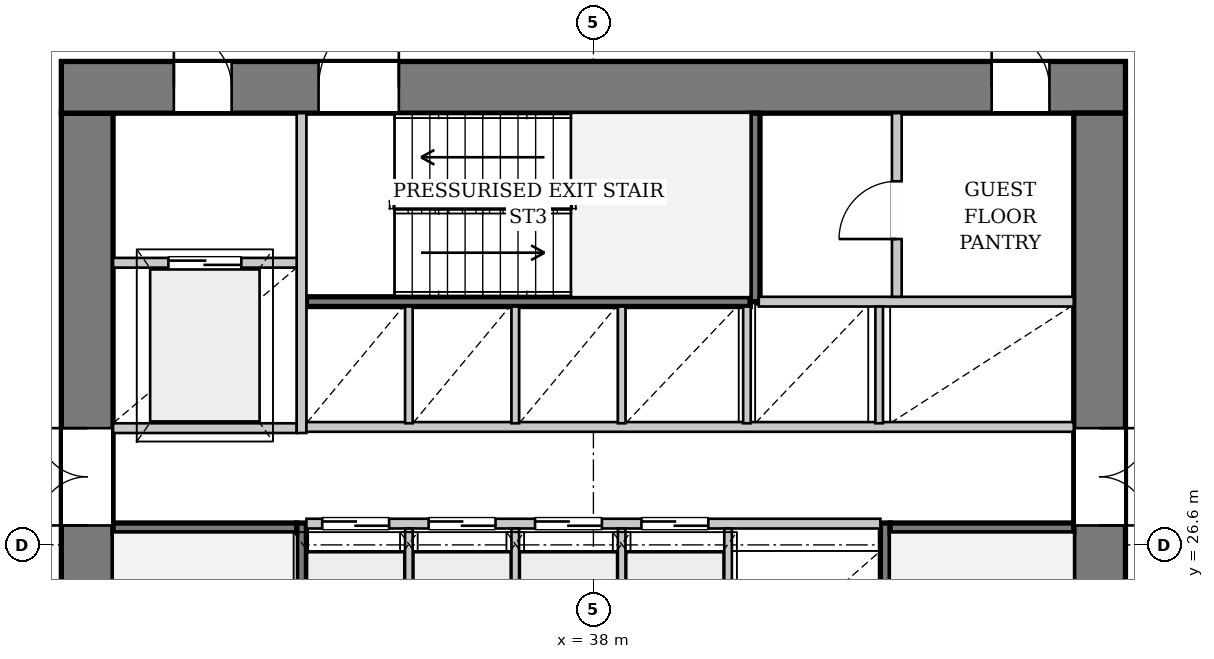
"""IFC4 building model, lengths in metres.
Left out: names, types, materials, properties, quantities, classifications, styles, units other than length and angle.
Written with IfcOpenShell. Run it as: python <this file> out.ifc"""

import sys

from ifc_helpers import new_model, si_unit, direction, frame, frame_2d, origin, place, context, subcontext, project, spatial, rectangle, extrude, source, transform, mapped, element, fill, save


model = new_model("IFC4")
c1 = context("Model", 3, precision=1e-05, world=origin(), true_north=direction((0.0, 1.0)))
c2 = subcontext(c1, "Body", "Model", "MODEL_VIEW")
j1 = project(units=[si_unit("LENGTHUNIT", "METRE"), si_unit("PLANEANGLEUNIT", "RADIAN")], contexts=[c1])
p1 = place(None, origin())
s1 = spatial("IfcSite", under=j1, at=p1, CompositionType="ELEMENT")
p2 = place(p1, origin())
s2 = spatial("IfcBuilding", under=s1, at=p2, CompositionType="ELEMENT")
p3 = place(p2, frame((0.0, 0.0, 54.15)))
s3 = spatial("IfcBuildingStorey", under=s2, at=p3, CompositionType="ELEMENT", Elevation=54.15)
p4 = place(p3, frame((29.675, 19.5, 0.0), z_axis=(0.0, 0.0, 1.0), x_axis=(0.0, 1.0, 0.0)))
e1 = element("IfcWall", 1, at=p4, inside=s3, PredefinedType="SHEAR", context=c2, shape_type="SweptSolid", body=[
    extrude(rectangle(XDim=14.2, YDim=0.85, at=frame_2d((7.1, 0.0))), origin(), (0.0, 0.0, 1.0), 3.3),
])
p5 = place(p4, frame((7.42, 0.0, 0.0)))
e2 = element("IfcOpeningElement", 2, at=p5, cuts=e1, PredefinedType="OPENING", context=c2, shape_type="SweptSolid", body=[
    extrude(rectangle(XDim=1.6, YDim=2.2, at=frame_2d((0.8, 1.1))), frame((0.0, 0.435, 0.0), z_axis=(0.0, -1.0, 0.0), x_axis=(1.0, 0.0, 0.0)), (0.0, 0.0, 1.0), 0.87),
])
p6 = place(p3, frame((29.25, 34.125, 0.0), z_axis=(0.0, 0.0, 1.0), x_axis=(1.0, 0.0, 0.0)))
e3 = element("IfcWall", 3, at=p6, inside=s3, PredefinedType="SHEAR", context=c2, shape_type="SweptSolid", body=[
    extrude(rectangle(XDim=17.5, YDim=0.85, at=frame_2d((8.75, 0.0))), origin(), (0.0, 0.0, 1.0), 3.3),
])
p7 = place(p6, frame((1.85, 0.0, 0.0)))
e4 = element("IfcOpeningElement", 4, at=p7, cuts=e3, PredefinedType="OPENING", context=c2, shape_type="SweptSolid", body=[
    extrude(rectangle(XDim=0.95, YDim=2.1, at=frame_2d((0.475, 1.05))), frame((0.0, 0.435, 0.0), z_axis=(0.0, -1.0, 0.0), x_axis=(1.0, 0.0, 0.0)), (0.0, 0.0, 1.0), 0.87),
])
p8 = place(p6, frame((4.23, 0.0, 0.0)))
e5 = element("IfcOpeningElement", 5, at=p8, cuts=e3, PredefinedType="OPENING", context=c2, shape_type="SweptSolid", body=[
    extrude(rectangle(XDim=1.32, YDim=2.2, at=frame_2d((0.66, 1.1))), frame((0.0, 0.435, 0.0), z_axis=(0.0, -1.0, 0.0), x_axis=(1.0, 0.0, 0.0)), (0.0, 0.0, 1.0), 0.87),
])
p9 = place(p6, frame((15.3, 0.0, 0.0)))
e6 = element("IfcOpeningElement", 6, at=p9, cuts=e3, PredefinedType="OPENING", context=c2, shape_type="SweptSolid", body=[
    extrude(rectangle(XDim=0.95, YDim=2.1, at=frame_2d((0.475, 1.05))), frame((0.0, 0.435, 0.0), z_axis=(0.0, -1.0, 0.0), x_axis=(1.0, 0.0, 0.0)), (0.0, 0.0, 1.0), 0.87),
])
p10 = place(p3, frame((46.325, 33.7, 0.0), z_axis=(0.0, 0.0, 1.0), x_axis=(0.0, -1.0, 0.0)))
e7 = element("IfcWall", 7, at=p10, inside=s3, PredefinedType="SHEAR", context=c2, shape_type="SweptSolid", body=[
    extrude(rectangle(XDim=14.2, YDim=0.85, at=frame_2d((7.1, 0.0))), origin(), (0.0, 0.0, 1.0), 3.3),
])
p11 = place(p10, frame((5.18, 0.0, 0.0)))
e8 = element("IfcOpeningElement", 8, at=p11, cuts=e7, PredefinedType="OPENING", context=c2, shape_type="SweptSolid", body=[
    extrude(rectangle(XDim=1.6, YDim=2.2, at=frame_2d((0.8, 1.1))), frame((0.0, 0.435, 0.0), z_axis=(0.0, -1.0, 0.0), x_axis=(1.0, 0.0, 0.0)), (0.0, 0.0, 1.0), 0.87),
])
p12 = place(p3, frame((33.2, 19.5, 0.0), z_axis=(0.0, 0.0, 1.0), x_axis=(0.0, 1.0, 0.0)))
e9 = element("IfcWall", 9, at=p12, inside=s3, PredefinedType="PARTITIONING", context=c2, shape_type="SweptSolid", body=[
    extrude(rectangle(XDim=7.46, YDim=0.16, at=frame_2d((3.73, 0.0))), origin(), (0.0, 0.0, 1.0), 3.3),
])
p13 = place(p12, frame((0.08, 0.0, 0.0)))
e10 = element("IfcOpeningElement", 10, at=p13, cuts=e9, PredefinedType="OPENING", context=c2, shape_type="SweptSolid", body=[
    extrude(rectangle(XDim=1.32, YDim=2.2, at=frame_2d((0.66, 1.1))), frame((0.0, 0.09, 0.0), z_axis=(0.0, -1.0, 0.0), x_axis=(1.0, 0.0, 0.0)), (0.0, 0.0, 1.0), 0.18),
])
p14 = place(p3, frame((30.1, 26.88, 0.0), z_axis=(0.0, 0.0, 1.0), x_axis=(1.0, 0.0, 0.0)))
e11 = element("IfcWall", 11, at=p14, inside=s3, PredefinedType="PARTITIONING", context=c2, shape_type="SweptSolid", body=[
    extrude(rectangle(XDim=3.02, YDim=0.16, at=frame_2d((1.51, 0.0))), origin(), (0.0, 0.0, 1.0), 3.3),
])
p15 = place(p3, frame((42.8, 26.96, 0.0), z_axis=(0.0, 0.0, 1.0), x_axis=(0.0, -1.0, 0.0)))
e12 = element("IfcWall", 12, at=p15, inside=s3, PredefinedType="PARTITIONING", context=c2, shape_type="SweptSolid", body=[
    extrude(rectangle(XDim=7.46, YDim=0.16, at=frame_2d((3.73, 0.0))), origin(), (0.0, 0.0, 1.0), 3.3),
])
p16 = place(p15, frame((6.06, 0.0, 0.0)))
e13 = element("IfcOpeningElement", 13, at=p16, cuts=e12, PredefinedType="OPENING", context=c2, shape_type="SweptSolid", body=[
    extrude(rectangle(XDim=1.32, YDim=2.2, at=frame_2d((0.66, 1.1))), frame((0.0, 0.09, 0.0), z_axis=(0.0, -1.0, 0.0), x_axis=(1.0, 0.0, 0.0)), (0.0, 0.0, 1.0), 0.18),
])
p17 = place(p3, frame((42.88, 26.88, 0.0), z_axis=(0.0, 0.0, 1.0), x_axis=(1.0, 0.0, 0.0)))
e14 = element("IfcWall", 14, at=p17, inside=s3, PredefinedType="PARTITIONING", context=c2, shape_type="SweptSolid", body=[
    extrude(rectangle(XDim=3.02, YDim=0.16, at=frame_2d((1.51, 0.0))), origin(), (0.0, 0.0, 1.0), 3.3),
])
p18 = place(p3, frame((33.28, 30.6, 0.0), z_axis=(0.0, 0.0, 1.0), x_axis=(1.0, 0.0, 0.0)))
e15 = element("IfcWall", 15, at=p18, inside=s3, PredefinedType="PARTITIONING", context=c2, shape_type="SweptSolid", body=[
    extrude(rectangle(XDim=7.3, YDim=0.16, at=frame_2d((3.65, 0.0))), origin(), (0.0, 0.0, 1.0), 3.3),
])
p19 = place(p3, frame((40.66, 30.6, 0.0), z_axis=(0.0, 0.0, 1.0), x_axis=(0.0, 1.0, 0.0)))
e16 = element("IfcWall", 16, at=p19, inside=s3, PredefinedType="PARTITIONING", context=c2, shape_type="SweptSolid", body=[
    extrude(rectangle(XDim=3.1, YDim=0.16, at=frame_2d((1.55, 0.0))), origin(), (0.0, 0.0, 1.0), 3.3),
])
p20 = place(p3, frame((30.1, 28.52, 0.0), z_axis=(0.0, 0.0, 1.0), x_axis=(1.0, 0.0, 0.0)))
e17 = element("IfcWall", 17, at=p20, inside=s3, PredefinedType="PARTITIONING", context=c2, shape_type="SweptSolid", body=[
    extrude(rectangle(XDim=3.02, YDim=0.16, at=frame_2d((1.51, 0.0))), origin(), (0.0, 0.0, 1.0), 3.3),
])
p21 = place(p3, frame((33.2, 28.44, 0.0), z_axis=(0.0, 0.0, 1.0), x_axis=(0.0, 1.0, 0.0)))
e18 = element("IfcWall", 18, at=p21, inside=s3, PredefinedType="PARTITIONING", context=c2, shape_type="SweptSolid", body=[
    extrude(rectangle(XDim=5.26, YDim=0.16, at=frame_2d((2.63, 0.0))), origin(), (0.0, 0.0, 1.0), 3.3),
])
p22 = place(p3, frame((30.1, 31.24, 0.0), z_axis=(0.0, 0.0, 1.0), x_axis=(1.0, 0.0, 0.0)))
e19 = element("IfcWall", 19, at=p22, inside=s3, PredefinedType="PARTITIONING", context=c2, shape_type="SweptSolid", body=[
    extrude(rectangle(XDim=3.02, YDim=0.16, at=frame_2d((1.51, 0.0))), origin(), (0.0, 0.0, 1.0), 3.3),
])
p23 = place(p22, frame((0.91, 0.0, 0.0)))
e20 = element("IfcOpeningElement", 20, at=p23, cuts=e19, PredefinedType="OPENING", context=c2, shape_type="SweptSolid", body=[
    extrude(rectangle(XDim=1.2, YDim=2.2, at=frame_2d((0.6, 1.1))), frame((0.0, 0.09, 0.0), z_axis=(0.0, -1.0, 0.0), x_axis=(1.0, 0.0, 0.0)), (0.0, 0.0, 1.0), 0.18),
])
p24 = place(p3, frame((33.28, 26.95, 0.0), z_axis=(0.0, 0.0, 1.0), x_axis=(1.0, 0.0, 0.0)))
e21 = element("IfcWall", 21, at=p24, inside=s3, PredefinedType="PARTITIONING", context=c2, shape_type="SweptSolid", body=[
    extrude(rectangle(XDim=9.44, YDim=0.16, at=frame_2d((4.72, 0.0))), origin(), (0.0, 0.0, 1.0), 3.3),
])
p25 = place(p24, frame((0.26, 0.0, 0.0)))
e22 = element("IfcOpeningElement", 22, at=p25, cuts=e21, PredefinedType="OPENING", context=c2, shape_type="SweptSolid", body=[
    extrude(rectangle(XDim=1.1, YDim=2.2, at=frame_2d((0.55, 1.1))), frame((0.0, 0.09, 0.0), z_axis=(0.0, -1.0, 0.0), x_axis=(1.0, 0.0, 0.0)), (0.0, 0.0, 1.0), 0.18),
])
p26 = place(p24, frame((2.01, 0.0, 0.0)))
e23 = element("IfcOpeningElement", 23, at=p26, cuts=e21, PredefinedType="OPENING", context=c2, shape_type="SweptSolid", body=[
    extrude(rectangle(XDim=1.1, YDim=2.2, at=frame_2d((0.55, 1.1))), frame((0.0, 0.09, 0.0), z_axis=(0.0, -1.0, 0.0), x_axis=(1.0, 0.0, 0.0)), (0.0, 0.0, 1.0), 0.18),
])
p27 = place(p24, frame((3.76, 0.0, 0.0)))
e24 = element("IfcOpeningElement", 24, at=p27, cuts=e21, PredefinedType="OPENING", context=c2, shape_type="SweptSolid", body=[
    extrude(rectangle(XDim=1.1, YDim=2.2, at=frame_2d((0.55, 1.1))), frame((0.0, 0.09, 0.0), z_axis=(0.0, -1.0, 0.0), x_axis=(1.0, 0.0, 0.0)), (0.0, 0.0, 1.0), 0.18),
])
p28 = place(p24, frame((5.51, 0.0, 0.0)))
e25 = element("IfcOpeningElement", 25, at=p28, cuts=e21, PredefinedType="OPENING", context=c2, shape_type="SweptSolid", body=[
    extrude(rectangle(XDim=1.1, YDim=2.2, at=frame_2d((0.55, 1.1))), frame((0.0, 0.09, 0.0), z_axis=(0.0, -1.0, 0.0), x_axis=(1.0, 0.0, 0.0)), (0.0, 0.0, 1.0), 0.18),
])
for number, where, z_axis, x_axis in (
    (26, (34.965, 24.56, 0.0), (0.0, 0.0, 1.0), (0.0, 1.0, 0.0)),
    (27, (36.715, 24.56, 0.0), (0.0, 0.0, 1.0), (0.0, 1.0, 0.0)),
    (28, (38.465, 24.56, 0.0), (0.0, 0.0, 1.0), (0.0, 1.0, 0.0)),
    (29, (40.215, 24.56, 0.0), (0.0, 0.0, 1.0), (0.0, 1.0, 0.0)),
):
    element("IfcWall", number, at=place(p3, frame(where, z_axis=z_axis, x_axis=x_axis)), inside=s3, PredefinedType="PARTITIONING", context=c2, shape_type="SweptSolid", body=[
        extrude(rectangle(XDim=2.31, YDim=0.125, at=frame_2d((1.155, 0.0))), origin(), (0.0, 0.0, 1.0), 3.3),
    ])
p29 = place(p3, frame((33.28, 28.54, 0.0), z_axis=(0.0, 0.0, 1.0), x_axis=(1.0, 0.0, 0.0)))
e30 = element("IfcWall", 30, at=p29, inside=s3, PredefinedType="PARTITIONING", context=c2, shape_type="SweptSolid", body=[
    extrude(rectangle(XDim=12.62, YDim=0.16, at=frame_2d((6.31, 0.0))), origin(), (0.0, 0.0, 1.0), 3.3),
])
p30 = place(p3, frame((40.72, 30.6, 0.0), z_axis=(0.0, 0.0, 1.0), x_axis=(1.0, 0.0, 0.0)))
e31 = element("IfcWall", 31, at=p30, inside=s3, PredefinedType="PARTITIONING", context=c2, shape_type="SweptSolid", body=[
    extrude(rectangle(XDim=5.18, YDim=0.16, at=frame_2d((2.59, 0.0))), origin(), (0.0, 0.0, 1.0), 3.3),
])
for number, where, z_axis, x_axis in (
    (32, (34.965, 28.6, 0.0), (0.0, 0.0, 1.0), (0.0, 1.0, 0.0)),
    (33, (36.715, 28.6, 0.0), (0.0, 0.0, 1.0), (0.0, 1.0, 0.0)),
    (34, (38.465, 28.6, 0.0), (0.0, 0.0, 1.0), (0.0, 1.0, 0.0)),
    (35, (40.525, 28.6, 0.0), (0.0, 0.0, 1.0), (0.0, 1.0, 0.0)),
    (36, (42.7, 28.6, 0.0), (0.0, 0.0, 1.0), (0.0, 1.0, 0.0)),
):
    element("IfcWall", number, at=place(p3, frame(where, z_axis=z_axis, x_axis=x_axis)), inside=s3, PredefinedType="PARTITIONING", context=c2, shape_type="SweptSolid", body=[
        extrude(rectangle(XDim=1.92, YDim=0.125, at=frame_2d((0.96, 0.0))), origin(), (0.0, 0.0, 1.0), 3.3),
    ])
p31 = place(p3, frame((42.99, 30.68, 0.0), z_axis=(0.0, 0.0, 1.0), x_axis=(0.0, 1.0, 0.0)))
e37 = element("IfcWall", 37, at=p31, inside=s3, PredefinedType="PARTITIONING", context=c2, shape_type="SweptSolid", body=[
    extrude(rectangle(XDim=3.02, YDim=0.16, at=frame_2d((1.51, 0.0))), origin(), (0.0, 0.0, 1.0), 3.3),
])
p32 = place(p31, frame((0.95, 0.0, 0.0)))
e38 = element("IfcOpeningElement", 38, at=p32, cuts=e37, PredefinedType="OPENING", context=c2, shape_type="SweptSolid", body=[
    extrude(rectangle(XDim=0.95, YDim=2.1, at=frame_2d((0.475, 1.05))), frame((0.0, 0.09, 0.0), z_axis=(0.0, -1.0, 0.0), x_axis=(1.0, 0.0, 0.0)), (0.0, 0.0, 1.0), 0.18),
])
m1 = source(origin(), c2, "Body", "SweptSolid", [
    extrude(rectangle(XDim=1.6, YDim=2.2, at=frame_2d((0.8, 1.1))), frame((0.0, 0.025, 0.0), z_axis=(0.0, -1.0, 0.0), x_axis=(1.0, 0.0, 0.0)), (0.0, 0.0, 1.0), 0.05),
])
p33 = place(p5, origin())
e39 = element("IfcDoor", 39, at=p33, inside=s3, OperationType="DOUBLE_DOOR_SINGLE_SWING", PredefinedType="DOOR", context=c2, shape_type="MappedRepresentation", body=[
    mapped(m1, transform((0.0, 0.0, 0.0), x_axis=(1.0, 0.0, 0.0), y_axis=(0.0, 1.0, 0.0), z_axis=(0.0, 0.0, 1.0), scale=1.0)),
])
fill(e2, e39)
m2 = source(origin(), c2, "Body", "SweptSolid", [
    extrude(rectangle(XDim=0.95, YDim=2.1, at=frame_2d((0.475, 1.05))), frame((0.0, 0.025, 0.0), z_axis=(0.0, -1.0, 0.0), x_axis=(1.0, 0.0, 0.0)), (0.0, 0.0, 1.0), 0.05),
])
p34 = place(p7, origin())
e40 = element("IfcDoor", 40, at=p34, inside=s3, OperationType="SINGLE_SWING_LEFT", PredefinedType="DOOR", context=c2, shape_type="MappedRepresentation", body=[
    mapped(m2, transform((0.0, 0.0, 0.0), x_axis=(1.0, 0.0, 0.0), y_axis=(0.0, 1.0, 0.0), z_axis=(0.0, 0.0, 1.0), scale=1.0)),
])
fill(e4, e40)
m3 = source(origin(), c2, "Body", "SweptSolid", [
    extrude(rectangle(XDim=1.32, YDim=2.2, at=frame_2d((0.66, 1.1))), frame((0.0, 0.025, 0.0), z_axis=(0.0, -1.0, 0.0), x_axis=(1.0, 0.0, 0.0)), (0.0, 0.0, 1.0), 0.05),
])
p35 = place(p8, origin())
e41 = element("IfcDoor", 41, at=p35, inside=s3, OperationType="SINGLE_SWING_RIGHT", PredefinedType="DOOR", context=c2, shape_type="MappedRepresentation", body=[
    mapped(m3, transform((0.0, 0.0, 0.0), x_axis=(1.0, 0.0, 0.0), y_axis=(0.0, 1.0, 0.0), z_axis=(0.0, 0.0, 1.0), scale=1.0)),
])
fill(e5, e41)
p36 = place(p11, origin())
e42 = element("IfcDoor", 42, at=p36, inside=s3, OperationType="DOUBLE_DOOR_SINGLE_SWING", PredefinedType="DOOR", context=c2, shape_type="MappedRepresentation", body=[
    mapped(m1, transform((0.0, 0.0, 0.0), x_axis=(1.0, 0.0, 0.0), y_axis=(0.0, 1.0, 0.0), z_axis=(0.0, 0.0, 1.0), scale=1.0)),
])
fill(e8, e42)
m4 = source(origin(), c2, "Body", "SweptSolid", [
    extrude(rectangle(XDim=1.2, YDim=2.2, at=frame_2d((0.6, 1.1))), frame((0.0, 0.025, 0.0), z_axis=(0.0, -1.0, 0.0), x_axis=(1.0, 0.0, 0.0)), (0.0, 0.0, 1.0), 0.05),
])
p37 = place(p23, origin())
e43 = element("IfcDoor", 43, at=p37, inside=s3, OperationType="DOUBLE_DOOR_SLIDING", PredefinedType="DOOR", context=c2, shape_type="MappedRepresentation", body=[
    mapped(m4, transform((0.0, 0.0, 0.0), x_axis=(1.0, 0.0, 0.0), y_axis=(0.0, 1.0, 0.0), z_axis=(0.0, 0.0, 1.0), scale=1.0)),
])
fill(e20, e43)
m5 = source(origin(), c2, "Body", "SweptSolid", [
    extrude(rectangle(XDim=1.1, YDim=2.2, at=frame_2d((0.55, 1.1))), frame((0.0, 0.025, 0.0), z_axis=(0.0, -1.0, 0.0), x_axis=(1.0, 0.0, 0.0)), (0.0, 0.0, 1.0), 0.05),
])
p38 = place(p25, origin())
e44 = element("IfcDoor", 44, at=p38, inside=s3, OperationType="DOUBLE_DOOR_SLIDING", PredefinedType="DOOR", context=c2, shape_type="MappedRepresentation", body=[
    mapped(m5, transform((0.0, 0.0, 0.0), x_axis=(1.0, 0.0, 0.0), y_axis=(0.0, 1.0, 0.0), z_axis=(0.0, 0.0, 1.0), scale=1.0)),
])
fill(e22, e44)
p39 = place(p26, origin())
e45 = element("IfcDoor", 45, at=p39, inside=s3, OperationType="DOUBLE_DOOR_SLIDING", PredefinedType="DOOR", context=c2, shape_type="MappedRepresentation", body=[
    mapped(m5, transform((0.0, 0.0, 0.0), x_axis=(1.0, 0.0, 0.0), y_axis=(0.0, 1.0, 0.0), z_axis=(0.0, 0.0, 1.0), scale=1.0)),
])
fill(e23, e45)
p40 = place(p27, origin())
e46 = element("IfcDoor", 46, at=p40, inside=s3, OperationType="DOUBLE_DOOR_SLIDING", PredefinedType="DOOR", context=c2, shape_type="MappedRepresentation", body=[
    mapped(m5, transform((0.0, 0.0, 0.0), x_axis=(1.0, 0.0, 0.0), y_axis=(0.0, 1.0, 0.0), z_axis=(0.0, 0.0, 1.0), scale=1.0)),
])
fill(e24, e46)
p41 = place(p28, origin())
e47 = element("IfcDoor", 47, at=p41, inside=s3, OperationType="DOUBLE_DOOR_SLIDING", PredefinedType="DOOR", context=c2, shape_type="MappedRepresentation", body=[
    mapped(m5, transform((0.0, 0.0, 0.0), x_axis=(1.0, 0.0, 0.0), y_axis=(0.0, 1.0, 0.0), z_axis=(0.0, 0.0, 1.0), scale=1.0)),
])
fill(e25, e47)
p42 = place(p32, origin())
e48 = element("IfcDoor", 48, at=p42, inside=s3, OperationType="SINGLE_SWING_LEFT", PredefinedType="DOOR", context=c2, shape_type="MappedRepresentation", body=[
    mapped(m2, transform((0.0, 0.0, 0.0), x_axis=(1.0, 0.0, 0.0), y_axis=(0.0, 1.0, 0.0), z_axis=(0.0, 0.0, 1.0), scale=1.0)),
])
fill(e38, e48)
p43 = place(p9, origin())
e49 = element("IfcDoor", 49, at=p43, inside=s3, OperationType="SINGLE_SWING_LEFT", PredefinedType="DOOR", context=c2, shape_type="MappedRepresentation", body=[
    mapped(m2, transform((0.0, 0.0, 0.0), x_axis=(1.0, 0.0, 0.0), y_axis=(0.0, 1.0, 0.0), z_axis=(0.0, 0.0, 1.0), scale=1.0)),
])
fill(e6, e49)
save(model, sys.argv[1])
